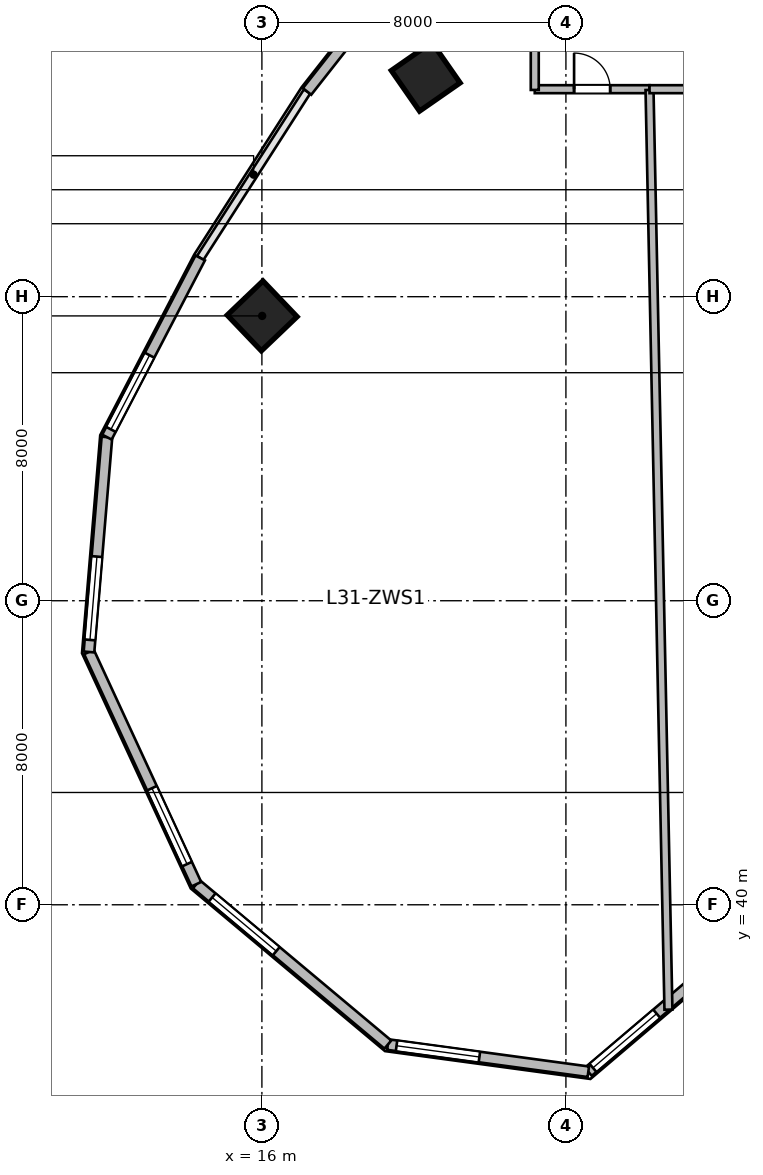
"""IFC4 building model, lengths in metres.
Left out: names, types, materials, properties, quantities, classifications, styles, units other than length and angle.
Written with IfcOpenShell. Run it as: python <this file> out.ifc"""

import sys

from ifc_helpers import new_model, si_unit, direction, frame, frame_2d, origin, origin_2d, place, context, subcontext, project, spatial, rectangle, extrude, source, transform, mapped, element, fill, save


model = new_model("IFC4")
c1 = context("Model", 3, precision=1e-05, world=origin(), true_north=direction((0.0, 1.0)))
c2 = subcontext(c1, "Body", "Model", "MODEL_VIEW")
j1 = project(units=[si_unit("LENGTHUNIT", "METRE"), si_unit("PLANEANGLEUNIT", "RADIAN")], contexts=[c1])
p1 = place(None, origin())
s1 = spatial("IfcSite", under=j1, at=p1, CompositionType="ELEMENT")
p2 = place(p1, origin())
s2 = spatial("IfcBuilding", under=s1, at=p2, CompositionType="ELEMENT")
p3 = place(p2, frame((0.0, 0.0, 131.1)))
s3 = spatial("IfcBuildingStorey", under=s2, at=p3, CompositionType="ELEMENT", Elevation=131.1)
m1 = source(origin(), c2, "Body", "SweptSolid", [
    extrude(rectangle(XDim=1.3, YDim=1.3, at=origin_2d()), origin(), (0.0, 0.0, 1.0), 3.9),
])
for number, where, z_axis, x_axis in (
    (1, (16.007, 55.494, 0.0), (0.0, 0.0, 1.0), (-0.691, 0.723, 0.0)),
    (2, (20.311, 61.789, 0.0), (0.0, 0.0, 1.0), (-0.571, 0.821, 0.0)),
):
    element("IfcColumn", number, at=place(p3, frame(where, z_axis=z_axis, x_axis=x_axis)), inside=s3, PredefinedType="COLUMN", context=c2, shape_type="MappedRepresentation", body=[
        mapped(m1, transform((0.0, 0.0, 0.0), scale=1.0)),
    ])
m2 = source(origin(), c2, "Body", "SweptSolid", [
    extrude(rectangle(XDim=4.659, YDim=0.28, at=frame_2d((2.33, 0.0))), origin(), (0.0, 0.0, 1.0), 3.65),
])
p4 = place(p3, frame((28.139, 38.624, 0.0), z_axis=(0.0, 0.0, 1.0), x_axis=(-0.761913458795, -0.647678841176, 0.0)))
e3 = element("IfcWall", 3, at=p4, inside=s3, PredefinedType="SOLIDWALL", context=c2, shape_type="MappedRepresentation", body=[
    mapped(m2, transform((0.0, 0.0, 0.0), scale=1.0)),
])
p5 = place(p4, frame((2.299, 0.0, 0.95)))
e4 = element("IfcOpeningElement", 4, at=p5, cuts=e3, PredefinedType="OPENING", context=c2, shape_type="SweptSolid", body=[
    extrude(rectangle(XDim=2.2, YDim=2.1, at=frame_2d((1.1, 1.05))), frame((0.0, 0.15, 0.0), z_axis=(0.0, -1.0, 0.0), x_axis=(1.0, 0.0, 0.0)), (0.0, 0.0, 1.0), 0.3),
])
m3 = source(origin(), c2, "Body", "SweptSolid", [
    extrude(rectangle(XDim=5.324, YDim=0.28, at=frame_2d((2.662, 0.0))), origin(), (0.0, 0.0, 1.0), 3.65),
])
p6 = place(p3, frame((24.59, 35.606, 0.0), z_axis=(0.0, 0.0, 1.0), x_axis=(-0.990931467223, 0.134368252451, 0.0)))
e5 = element("IfcWall", 5, at=p6, inside=s3, PredefinedType="SOLIDWALL", context=c2, shape_type="MappedRepresentation", body=[
    mapped(m3, transform((0.0, 0.0, 0.0), scale=1.0)),
])
p7 = place(p6, frame((2.893, 0.0, 0.95)))
e6 = element("IfcOpeningElement", 6, at=p7, cuts=e5, PredefinedType="OPENING", context=c2, shape_type="SweptSolid", body=[
    extrude(rectangle(XDim=2.2, YDim=2.1, at=frame_2d((1.1, 1.05))), frame((0.0, 0.15, 0.0), z_axis=(0.0, -1.0, 0.0), x_axis=(1.0, 0.0, 0.0)), (0.0, 0.0, 1.0), 0.3),
])
m4 = source(origin(), c2, "Body", "SweptSolid", [
    extrude(rectangle(XDim=6.573, YDim=0.28, at=frame_2d((3.287, 0.0))), origin(), (0.0, 0.0, 1.0), 3.65),
])
p8 = place(p3, frame((19.314, 36.322, 0.0), z_axis=(0.0, 0.0, 1.0), x_axis=(-0.766715154163, 0.641987439423, 0.0)))
e7 = element("IfcWall", 7, at=p8, inside=s3, PredefinedType="SOLIDWALL", context=c2, shape_type="MappedRepresentation", body=[
    mapped(m4, transform((0.0, 0.0, 0.0), scale=1.0)),
])
p9 = place(p8, frame((3.83, 0.0, 0.95)))
e8 = element("IfcOpeningElement", 8, at=p9, cuts=e7, PredefinedType="OPENING", context=c2, shape_type="SweptSolid", body=[
    extrude(rectangle(XDim=2.2, YDim=2.1, at=frame_2d((1.1, 1.05))), frame((0.0, 0.15, 0.0), z_axis=(0.0, -1.0, 0.0), x_axis=(1.0, 0.0, 0.0)), (0.0, 0.0, 1.0), 0.3),
])
m5 = source(origin(), c2, "Body", "SweptSolid", [
    extrude(rectangle(XDim=6.732, YDim=0.28, at=frame_2d((3.366, 0.0))), origin(), (0.0, 0.0, 1.0), 3.65),
])
p10 = place(p3, frame((14.275, 40.541, 0.0), z_axis=(0.0, 0.0, 1.0), x_axis=(-0.419644552709, 0.907688520023, 0.0)))
e9 = element("IfcWall", 9, at=p10, inside=s3, PredefinedType="SOLIDWALL", context=c2, shape_type="MappedRepresentation", body=[
    mapped(m5, transform((0.0, 0.0, 0.0), scale=1.0)),
])
p11 = place(p10, frame((0.583, 0.0, 0.95)))
e10 = element("IfcOpeningElement", 10, at=p11, cuts=e9, PredefinedType="OPENING", context=c2, shape_type="SweptSolid", body=[
    extrude(rectangle(XDim=2.2, YDim=2.1, at=frame_2d((1.1, 1.05))), frame((0.0, 0.15, 0.0), z_axis=(0.0, -1.0, 0.0), x_axis=(1.0, 0.0, 0.0)), (0.0, 0.0, 1.0), 0.3),
])
m6 = source(origin(), c2, "Body", "SweptSolid", [
    extrude(rectangle(XDim=5.674, YDim=0.28, at=frame_2d((2.837, 0.0))), origin(), (0.0, 0.0, 1.0), 3.65),
])
p12 = place(p3, frame((11.45, 46.652, 0.0), z_axis=(0.0, 0.0, 1.0), x_axis=(0.083309007867, 0.996523762491, 0.0)))
e11 = element("IfcWall", 11, at=p12, inside=s3, PredefinedType="SOLIDWALL", context=c2, shape_type="MappedRepresentation", body=[
    mapped(m6, transform((0.0, 0.0, 0.0), scale=1.0)),
])
p13 = place(p12, frame((0.318, 0.0, 0.95)))
e12 = element("IfcOpeningElement", 12, at=p13, cuts=e11, PredefinedType="OPENING", context=c2, shape_type="SweptSolid", body=[
    extrude(rectangle(XDim=2.2, YDim=2.1, at=frame_2d((1.1, 1.05))), frame((0.0, 0.15, 0.0), z_axis=(0.0, -1.0, 0.0), x_axis=(1.0, 0.0, 0.0)), (0.0, 0.0, 1.0), 0.3),
])
m7 = source(origin(), c2, "Body", "SweptSolid", [
    extrude(rectangle(XDim=5.315, YDim=0.28, at=frame_2d((2.658, 0.0))), origin(), (0.0, 0.0, 1.0), 3.65),
])
p14 = place(p3, frame((11.922, 52.305, 0.0), z_axis=(0.0, 0.0, 1.0), x_axis=(0.461760527822, 0.887004630735, 0.0)))
e13 = element("IfcWall", 13, at=p14, inside=s3, PredefinedType="SOLIDWALL", context=c2, shape_type="MappedRepresentation", body=[
    mapped(m7, transform((0.0, 0.0, 0.0), scale=1.0)),
])
p15 = place(p14, frame((0.229, 0.0, 0.95)))
e14 = element("IfcOpeningElement", 14, at=p15, cuts=e13, PredefinedType="OPENING", context=c2, shape_type="SweptSolid", body=[
    extrude(rectangle(XDim=2.2, YDim=2.1, at=frame_2d((1.1, 1.05))), frame((0.0, 0.15, 0.0), z_axis=(0.0, -1.0, 0.0), x_axis=(1.0, 0.0, 0.0)), (0.0, 0.0, 1.0), 0.3),
])
m8 = source(origin(), c2, "Body", "SweptSolid", [
    extrude(rectangle(XDim=5.058, YDim=0.28, at=frame_2d((2.529, 0.0))), origin(), (0.0, 0.0, 1.0), 3.65),
])
p16 = place(p3, frame((17.188, 61.4, 0.0), z_axis=(0.0, 0.0, 1.0), x_axis=(0.618145507434, 0.786063694391, 0.0)))
e15 = element("IfcWall", 15, at=p16, inside=s3, PredefinedType="SOLIDWALL", context=c2, shape_type="MappedRepresentation", body=[
    mapped(m8, transform((0.0, 0.0, 0.0), scale=1.0)),
])
m9 = source(origin(), c2, "Body", "SweptSolid", [
    extrude(rectangle(XDim=3.02, YDim=0.21, at=frame_2d((1.51, 0.0))), origin(), (0.0, 0.0, 1.0), 3.65),
])
p17 = place(p3, frame((23.18, 61.46, 0.0), z_axis=(0.0, 0.0, 1.0), x_axis=(1.0, 0.0, 0.0)))
e16 = element("IfcWall", 16, at=p17, inside=s3, PredefinedType="PARTITIONING", context=c2, shape_type="MappedRepresentation", body=[
    mapped(m9, transform((0.0, 0.0, 0.0), scale=1.0)),
])
p18 = place(p17, frame((1.035, 0.0, 0.0)))
e17 = element("IfcOpeningElement", 17, at=p18, cuts=e16, PredefinedType="OPENING", context=c2, shape_type="SweptSolid", body=[
    extrude(rectangle(XDim=0.95, YDim=2.1, at=frame_2d((0.475, 1.05))), frame((0.0, 0.115, 0.0), z_axis=(0.0, -1.0, 0.0), x_axis=(1.0, 0.0, 0.0)), (0.0, 0.0, 1.0), 0.23),
])
m10 = source(origin(), c2, "Body", "SweptSolid", [
    extrude(rectangle(XDim=24.204, YDim=0.21, at=frame_2d((12.102, 0.0))), origin(), (0.0, 0.0, 1.0), 2.942),
])
p19 = place(p3, frame((26.698, 37.241, 0.0), z_axis=(0.0, 0.0, 1.0), x_axis=(-0.020566881318, 0.999788479326, 0.0)))
e18 = element("IfcWall", 18, at=p19, inside=s3, PredefinedType="PARTITIONING", context=c2, shape_type="MappedRepresentation", body=[
    mapped(m10, transform((0.0, 0.0, 0.0), scale=1.0)),
])
m11 = source(origin(), c2, "Body", "SweptSolid", [
    extrude(rectangle(XDim=4.0, YDim=0.21, at=frame_2d((2.0, 0.0))), origin(), (0.0, 0.0, 1.0), 3.65),
])
p20 = place(p3, frame((26.2, 61.46, 0.0), z_axis=(0.0, 0.0, 1.0), x_axis=(1.0, 0.0, 0.0)))
e19 = element("IfcWall", 19, at=p20, inside=s3, PredefinedType="PARTITIONING", context=c2, shape_type="MappedRepresentation", body=[
    mapped(m11, transform((0.0, 0.0, 0.0), scale=1.0)),
])
p21 = place(p20, frame((1.525, 0.0, 0.0)))
e20 = element("IfcOpeningElement", 20, at=p21, cuts=e19, PredefinedType="OPENING", context=c2, shape_type="SweptSolid", body=[
    extrude(rectangle(XDim=0.95, YDim=2.1, at=frame_2d((0.475, 1.05))), frame((0.0, 0.115, 0.0), z_axis=(0.0, -1.0, 0.0), x_axis=(1.0, 0.0, 0.0)), (0.0, 0.0, 1.0), 0.23),
])
m12 = source(origin(), c2, "Body", "SweptSolid", [
    extrude(rectangle(XDim=2.62, YDim=0.21, at=frame_2d((1.31, 0.0))), origin(), (0.0, 0.0, 1.0), 3.65),
])
p22 = place(p3, frame((23.18, 61.44, 0.0), z_axis=(0.0, 0.0, 1.0), x_axis=(0.0, 1.0, 0.0)))
e21 = element("IfcWall", 21, at=p22, inside=s3, PredefinedType="PARTITIONING", context=c2, shape_type="MappedRepresentation", body=[
    mapped(m12, transform((0.0, 0.0, 0.0), scale=1.0)),
])
m13 = source(origin(), c2, "Body", "SweptSolid", [
    extrude(rectangle(XDim=2.2, YDim=2.1, at=frame_2d((1.1, 1.05))), frame((0.0, 0.03, 0.0), z_axis=(0.0, -1.0, 0.0), x_axis=(1.0, 0.0, 0.0)), (0.0, 0.0, 1.0), 0.06),
])
p23 = place(p5, origin())
e22 = element("IfcWindow", 22, at=p23, inside=s3, PartitioningType="TRIPLE_PANEL_VERTICAL", PredefinedType="WINDOW", context=c2, shape_type="MappedRepresentation", body=[
    mapped(m13, transform((0.0, 0.0, 0.0), scale=1.0)),
])
fill(e4, e22)
p24 = place(p7, origin())
e23 = element("IfcWindow", 23, at=p24, inside=s3, PartitioningType="TRIPLE_PANEL_VERTICAL", PredefinedType="WINDOW", context=c2, shape_type="MappedRepresentation", body=[
    mapped(m13, transform((0.0, 0.0, 0.0), scale=1.0)),
])
fill(e6, e23)
p25 = place(p9, origin())
e24 = element("IfcWindow", 24, at=p25, inside=s3, PartitioningType="TRIPLE_PANEL_VERTICAL", PredefinedType="WINDOW", context=c2, shape_type="MappedRepresentation", body=[
    mapped(m13, transform((0.0, 0.0, 0.0), scale=1.0)),
])
fill(e8, e24)
p26 = place(p11, origin())
e25 = element("IfcWindow", 25, at=p26, inside=s3, PartitioningType="TRIPLE_PANEL_VERTICAL", PredefinedType="WINDOW", context=c2, shape_type="MappedRepresentation", body=[
    mapped(m13, transform((0.0, 0.0, 0.0), scale=1.0)),
])
fill(e10, e25)
p27 = place(p13, origin())
e26 = element("IfcWindow", 26, at=p27, inside=s3, PartitioningType="TRIPLE_PANEL_VERTICAL", PredefinedType="WINDOW", context=c2, shape_type="MappedRepresentation", body=[
    mapped(m13, transform((0.0, 0.0, 0.0), scale=1.0)),
])
fill(e12, e26)
p28 = place(p15, origin())
e27 = element("IfcWindow", 27, at=p28, inside=s3, PartitioningType="TRIPLE_PANEL_VERTICAL", PredefinedType="WINDOW", context=c2, shape_type="MappedRepresentation", body=[
    mapped(m13, transform((0.0, 0.0, 0.0), scale=1.0)),
])
fill(e14, e27)
m14 = source(origin(), c2, "Body", "SweptSolid", [
    extrude(rectangle(XDim=0.95, YDim=2.1, at=frame_2d((0.475, 1.05))), frame((0.0, 0.025, 0.0), z_axis=(0.0, -1.0, 0.0), x_axis=(1.0, 0.0, 0.0)), (0.0, 0.0, 1.0), 0.05),
])
p29 = place(p18, origin())
e28 = element("IfcDoor", 28, at=p29, inside=s3, OperationType="SINGLE_SWING_LEFT", PredefinedType="DOOR", context=c2, shape_type="MappedRepresentation", body=[
    mapped(m14, transform((0.0, 0.0, 0.0), scale=1.0)),
])
fill(e17, e28)
save(model, sys.argv[1])
